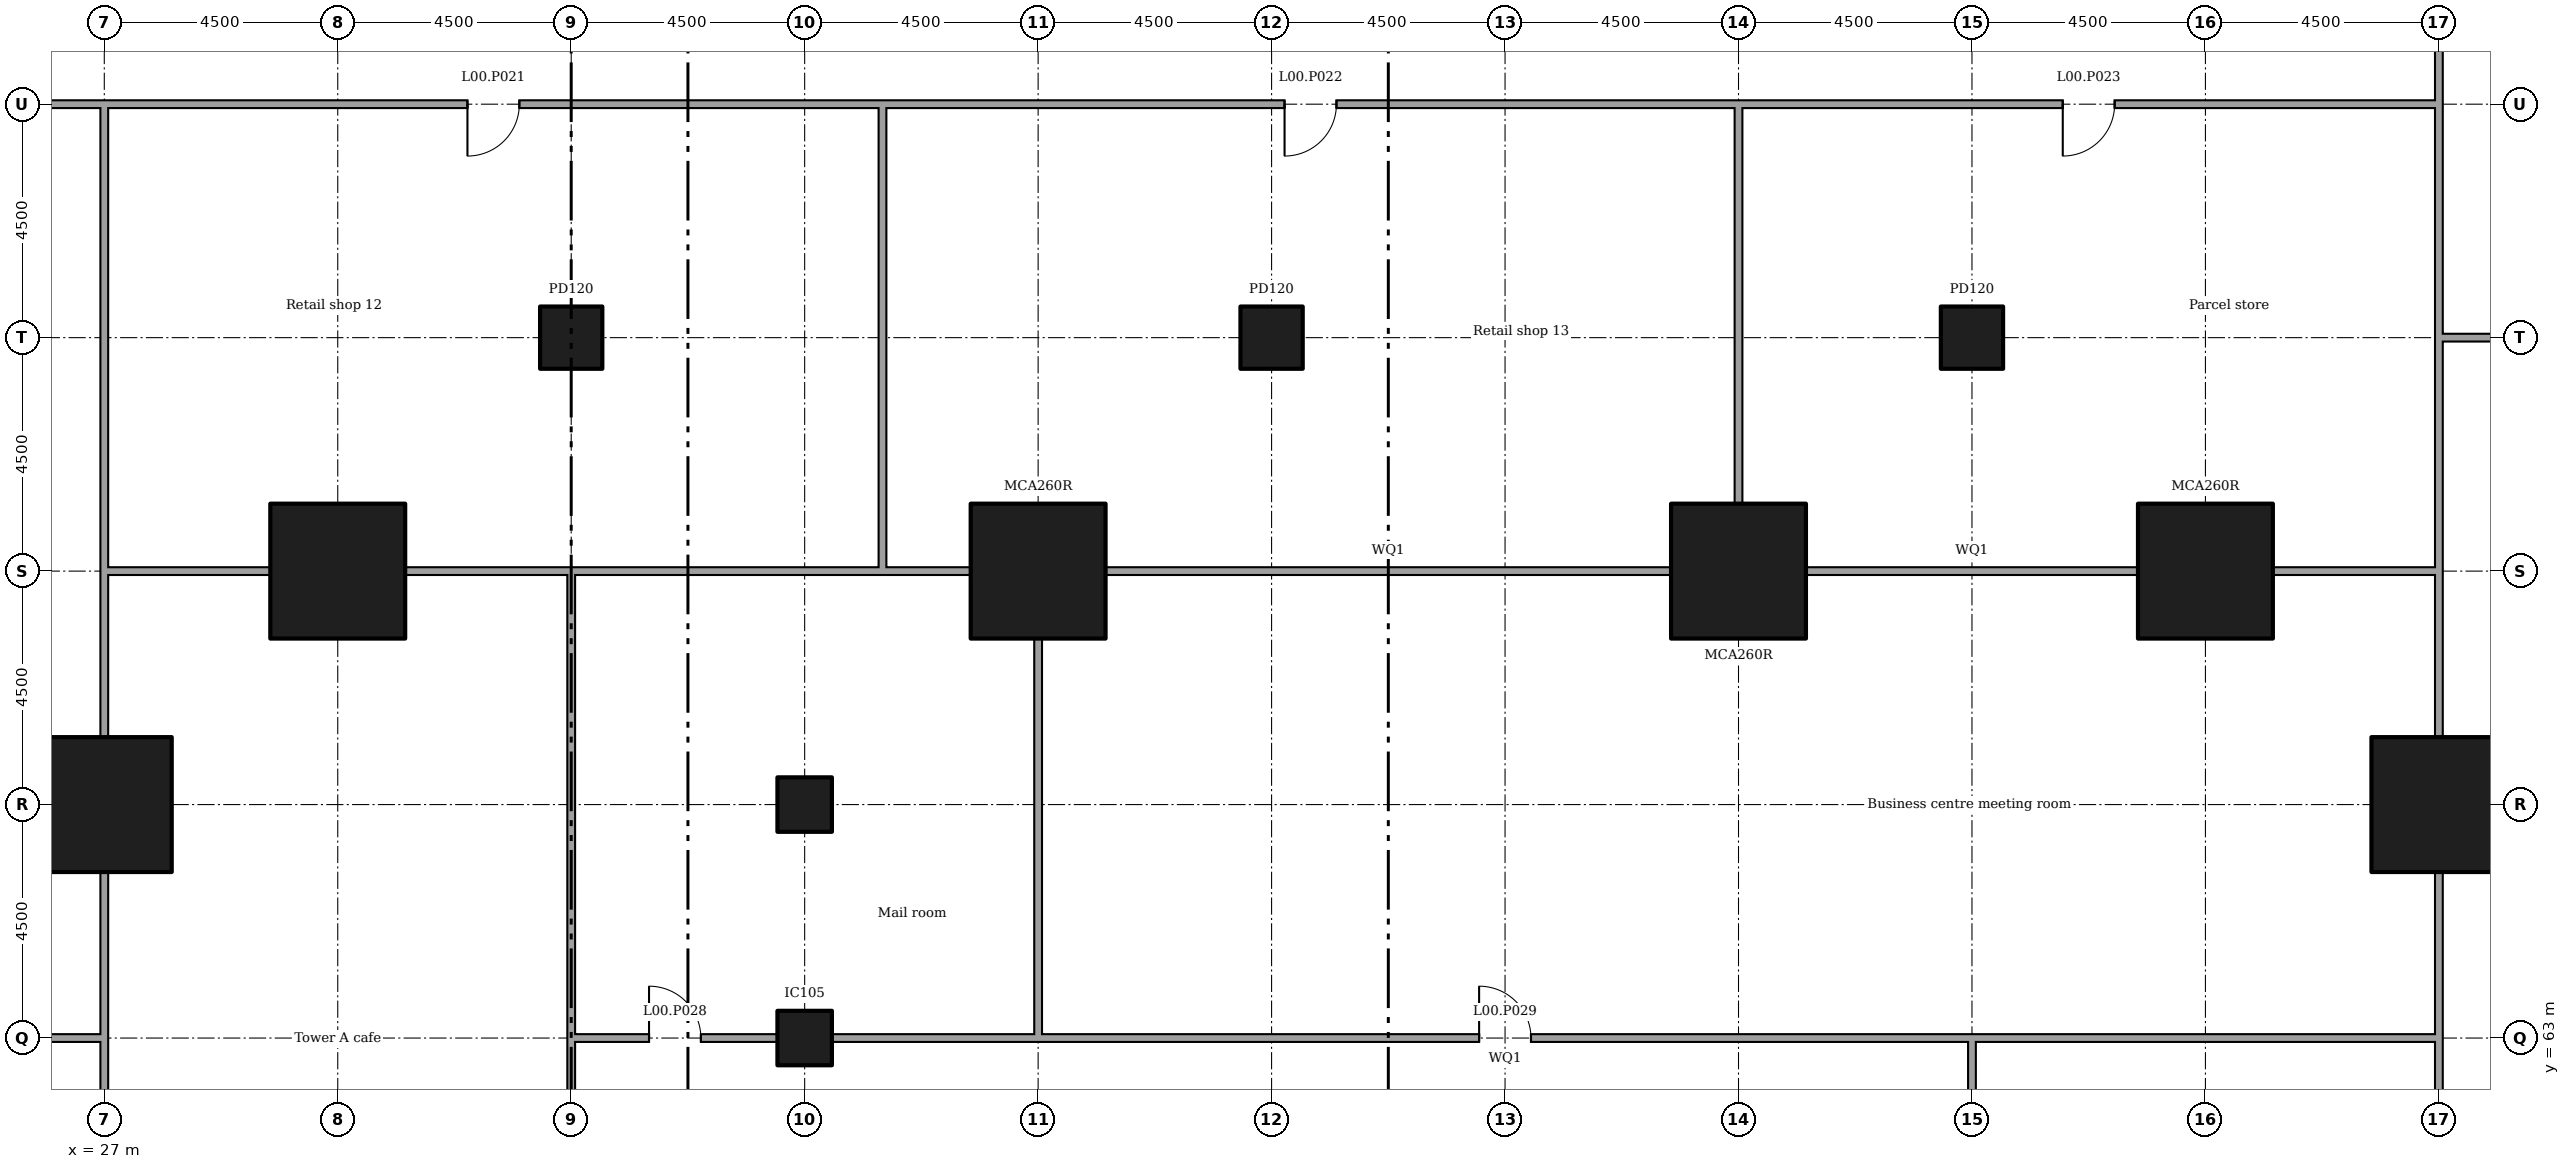
"""IFC4 building model, lengths in metres.
Left out: names, types, materials, properties, quantities, classifications, styles, units other than length and angle.
Written with IfcOpenShell. Run it as: python <this file> out.ifc"""

import sys

from ifc_helpers import new_model, si_unit, direction, frame, frame_2d, origin, origin_2d, place, context, subcontext, project, spatial, rectangle, extrude, element, fill, save


model = new_model("IFC4")
c1 = context("Model", 3, precision=1e-05, world=origin(), true_north=direction((0.0, 1.0)))
c2 = subcontext(c1, "Body", "Model", "MODEL_VIEW")
j1 = project(units=[si_unit("LENGTHUNIT", "METRE"), si_unit("PLANEANGLEUNIT", "RADIAN")], contexts=[c1])
p1 = place(None, origin())
s1 = spatial("IfcSite", under=j1, at=p1, CompositionType="ELEMENT")
p2 = place(p1, origin())
s2 = spatial("IfcBuilding", under=s1, at=p2, CompositionType="ELEMENT")
p3 = place(p2, origin())
s3 = spatial("IfcBuildingStorey", under=s2, at=p3, CompositionType="ELEMENT", Elevation=0.0)
for number, where in (
    (1, (27.0, 67.5, 0.0)),
    (2, (31.5, 72.0, 0.0)),
    (3, (45.0, 72.0, 0.0)),
    (4, (58.5, 72.0, 0.0)),
    (5, (67.5, 72.0, 0.0)),
    (6, (72.0, 67.5, 0.0)),
):
    element("IfcColumn", number, at=place(p3, frame(where)), inside=s3, PredefinedType="COLUMN", context=c2, shape_type="SweptSolid", body=[
        extrude(rectangle(XDim=2.6, YDim=2.6, at=origin_2d()), origin(), (0.0, 0.0, 1.0), 6.0),
    ])
for number, where in (
    (7, (40.5, 63.0, 0.0)),
    (8, (40.5, 67.5, 0.0)),
):
    element("IfcColumn", number, at=place(p3, frame(where)), inside=s3, PredefinedType="COLUMN", context=c2, shape_type="SweptSolid", body=[
        extrude(rectangle(XDim=1.05, YDim=1.05, at=origin_2d()), origin(), (0.0, 0.0, 1.0), 6.0),
    ])
for number, where in (
    (9, (36.0, 76.5, 0.0)),
    (10, (49.5, 76.5, 0.0)),
    (11, (63.0, 76.5, 0.0)),
):
    element("IfcColumn", number, at=place(p3, frame(where)), inside=s3, PredefinedType="COLUMN", context=c2, shape_type="SweptSolid", body=[
        extrude(rectangle(XDim=1.2, YDim=1.2, at=origin_2d()), origin(), (0.0, 0.0, 1.0), 6.0),
    ])
p4 = place(p3, frame((71.925, 76.5, 0.0)))
e12 = element("IfcWall", 12, at=p4, inside=s3, PredefinedType="PARTITIONING", context=c2, shape_type="SweptSolid", body=[
    extrude(rectangle(XDim=3.98, YDim=0.15, at=frame_2d((1.99, 0.0))), origin(), (0.0, 0.0, 1.0), 5.55),
])
p5 = place(p4, frame((1.125, 0.0, 0.0)))
e13 = element("IfcOpeningElement", 13, at=p5, cuts=e12, PredefinedType="OPENING", context=c2, shape_type="SweptSolid", body=[
    extrude(rectangle(XDim=1.8, YDim=2.1, at=frame_2d((0.9, 1.05))), frame((0.0, 0.085, 0.0), z_axis=(0.0, -1.0, 0.0), x_axis=(1.0, 0.0, 0.0)), (0.0, 0.0, 1.0), 0.17),
])
p6 = place(p3, frame((72.0, 71.925, 0.0), z_axis=(0.0, 0.0, 1.0), x_axis=(0.0, 1.0, 0.0)))
e14 = element("IfcWall", 14, at=p6, inside=s3, PredefinedType="PARTITIONING", context=c2, shape_type="SweptSolid", body=[
    extrude(rectangle(XDim=4.5, YDim=0.15, at=frame_2d((2.25, 0.0))), origin(), (0.0, 0.0, 1.0), 5.55),
])
p7 = place(p3, frame((72.0, 62.925, 0.0), z_axis=(0.0, 0.0, 1.0), x_axis=(0.0, 1.0, 0.0)))
e15 = element("IfcWall", 15, at=p7, inside=s3, PredefinedType="PARTITIONING", context=c2, shape_type="SweptSolid", body=[
    extrude(rectangle(XDim=3.28, YDim=0.15, at=frame_2d((1.64, 0.0))), origin(), (0.0, 0.0, 1.0), 5.55),
])
for number, where, z_axis, x_axis in (
    (16, (72.0, 68.795, 0.0), (0.0, 0.0, 1.0), (0.0, 1.0, 0.0)),
    (17, (72.0, 59.795, 0.0), (0.0, 0.0, 1.0), (0.0, 1.0, 0.0)),
):
    element("IfcWall", number, at=place(p3, frame(where, z_axis=z_axis, x_axis=x_axis)), inside=s3, PredefinedType="PARTITIONING", context=c2, shape_type="SweptSolid", body=[
        extrude(rectangle(XDim=3.205, YDim=0.15, at=frame_2d((1.603, 0.0))), origin(), (0.0, 0.0, 1.0), 5.55),
    ])
p8 = place(p3, frame((72.0, 80.925, 0.0), z_axis=(0.0, 0.0, 1.0), x_axis=(0.0, 1.0, 0.0)))
e18 = element("IfcWall", 18, at=p8, inside=s3, PredefinedType="PARTITIONING", context=c2, shape_type="SweptSolid", body=[
    extrude(rectangle(XDim=9.15, YDim=0.15, at=frame_2d((4.575, 0.0))), origin(), (0.0, 0.0, 1.0), 5.55),
])
p9 = place(p8, frame((3.675, 0.0, 0.0)))
e19 = element("IfcOpeningElement", 19, at=p9, cuts=e18, PredefinedType="OPENING", context=c2, shape_type="SweptSolid", body=[
    extrude(rectangle(XDim=1.8, YDim=2.1, at=frame_2d((0.9, 1.05))), frame((0.0, 0.085, 0.0), z_axis=(0.0, -1.0, 0.0), x_axis=(1.0, 0.0, 0.0)), (0.0, 0.0, 1.0), 0.17),
])
p10 = place(p3, frame((72.0, 76.5, 0.0), z_axis=(0.0, 0.0, 1.0), x_axis=(0.0, 1.0, 0.0)))
e20 = element("IfcWall", 20, at=p10, inside=s3, PredefinedType="PARTITIONING", context=c2, shape_type="SweptSolid", body=[
    extrude(rectangle(XDim=4.5, YDim=0.15, at=frame_2d((2.25, 0.0))), origin(), (0.0, 0.0, 1.0), 5.55),
])
p11 = place(p3, frame((18.075, 81.0, 0.0)))
e21 = element("IfcWall", 21, at=p11, inside=s3, PredefinedType="PARTITIONING", context=c2, shape_type="SweptSolid", body=[
    extrude(rectangle(XDim=9.0, YDim=0.15, at=frame_2d((4.5, 0.0))), origin(), (0.0, 0.0, 1.0), 5.55),
])
p12 = place(p3, frame((27.0, 81.0, 0.0)))
e22 = element("IfcWall", 22, at=p12, inside=s3, PredefinedType="PARTITIONING", context=c2, shape_type="SweptSolid", body=[
    extrude(rectangle(XDim=15.075, YDim=0.15, at=frame_2d((7.538, 0.0))), origin(), (0.0, 0.0, 1.0), 5.55),
])
p13 = place(p12, frame((7.0, 0.0, 0.0)))
e23 = element("IfcOpeningElement", 23, at=p13, cuts=e22, PredefinedType="OPENING", context=c2, shape_type="SweptSolid", body=[
    extrude(rectangle(XDim=1.0, YDim=2.1, at=frame_2d((0.5, 1.05))), frame((0.0, 0.085, 0.0), z_axis=(0.0, -1.0, 0.0), x_axis=(1.0, 0.0, 0.0)), (0.0, 0.0, 1.0), 0.17),
])
p14 = place(p3, frame((42.0, 81.0, 0.0)))
e24 = element("IfcWall", 24, at=p14, inside=s3, PredefinedType="PARTITIONING", context=c2, shape_type="SweptSolid", body=[
    extrude(rectangle(XDim=16.575, YDim=0.15, at=frame_2d((8.288, 0.0))), origin(), (0.0, 0.0, 1.0), 5.55),
])
p15 = place(p14, frame((7.75, 0.0, 0.0)))
e25 = element("IfcOpeningElement", 25, at=p15, cuts=e24, PredefinedType="OPENING", context=c2, shape_type="SweptSolid", body=[
    extrude(rectangle(XDim=1.0, YDim=2.1, at=frame_2d((0.5, 1.05))), frame((0.0, 0.085, 0.0), z_axis=(0.0, -1.0, 0.0), x_axis=(1.0, 0.0, 0.0)), (0.0, 0.0, 1.0), 0.17),
])
p16 = place(p3, frame((58.5, 81.0, 0.0)))
e26 = element("IfcWall", 26, at=p16, inside=s3, PredefinedType="PARTITIONING", context=c2, shape_type="SweptSolid", body=[
    extrude(rectangle(XDim=13.425, YDim=0.15, at=frame_2d((6.712, 0.0))), origin(), (0.0, 0.0, 1.0), 5.55),
])
p17 = place(p16, frame((6.25, 0.0, 0.0)))
e27 = element("IfcOpeningElement", 27, at=p17, cuts=e26, PredefinedType="OPENING", context=c2, shape_type="SweptSolid", body=[
    extrude(rectangle(XDim=1.0, YDim=2.1, at=frame_2d((0.5, 1.05))), frame((0.0, 0.085, 0.0), z_axis=(0.0, -1.0, 0.0), x_axis=(1.0, 0.0, 0.0)), (0.0, 0.0, 1.0), 0.17),
])
p18 = place(p3, frame((23.095, 63.0, 0.0)))
e28 = element("IfcWall", 28, at=p18, inside=s3, PredefinedType="PARTITIONING", context=c2, shape_type="SweptSolid", body=[
    extrude(rectangle(XDim=3.98, YDim=0.15, at=frame_2d((1.99, 0.0))), origin(), (0.0, 0.0, 1.0), 5.55),
])
p19 = place(p3, frame((27.0, 59.795, 0.0), z_axis=(0.0, 0.0, 1.0), x_axis=(0.0, 1.0, 0.0)))
e29 = element("IfcWall", 29, at=p19, inside=s3, PredefinedType="PARTITIONING", context=c2, shape_type="SweptSolid", body=[
    extrude(rectangle(XDim=3.13, YDim=0.15, at=frame_2d((1.565, 0.0))), origin(), (0.0, 0.0, 1.0), 5.55),
])
p20 = place(p3, frame((27.0, 71.925, 0.0), z_axis=(0.0, 0.0, 1.0), x_axis=(0.0, 1.0, 0.0)))
e30 = element("IfcWall", 30, at=p20, inside=s3, PredefinedType="PARTITIONING", context=c2, shape_type="SweptSolid", body=[
    extrude(rectangle(XDim=9.0, YDim=0.15, at=frame_2d((4.5, 0.0))), origin(), (0.0, 0.0, 1.0), 5.55),
])
for number, where, z_axis, x_axis in (
    (31, (27.0, 63.0, 0.0), (0.0, 0.0, 1.0), (0.0, 1.0, 0.0)),
    (32, (27.0, 68.795, 0.0), (0.0, 0.0, 1.0), (0.0, 1.0, 0.0)),
):
    element("IfcWall", number, at=place(p3, frame(where, z_axis=z_axis, x_axis=x_axis)), inside=s3, PredefinedType="PARTITIONING", context=c2, shape_type="SweptSolid", body=[
        extrude(rectangle(XDim=3.205, YDim=0.15, at=frame_2d((1.603, 0.0))), origin(), (0.0, 0.0, 1.0), 5.55),
    ])
p21 = place(p3, frame((42.0, 71.925, 0.0), z_axis=(0.0, 0.0, 1.0), x_axis=(0.0, 1.0, 0.0)))
e33 = element("IfcWall", 33, at=p21, inside=s3, PredefinedType="PARTITIONING", context=c2, shape_type="SweptSolid", body=[
    extrude(rectangle(XDim=9.0, YDim=0.15, at=frame_2d((4.5, 0.0))), origin(), (0.0, 0.0, 1.0), 5.55),
])
p22 = place(p3, frame((27.075, 72.0, 0.0)))
e34 = element("IfcWall", 34, at=p22, inside=s3, PredefinedType="PARTITIONING", context=c2, shape_type="SweptSolid", body=[
    extrude(rectangle(XDim=3.13, YDim=0.15, at=frame_2d((1.565, 0.0))), origin(), (0.0, 0.0, 1.0), 5.55),
])
p23 = place(p3, frame((32.795, 72.0, 0.0)))
e35 = element("IfcWall", 35, at=p23, inside=s3, PredefinedType="PARTITIONING", context=c2, shape_type="SweptSolid", body=[
    extrude(rectangle(XDim=3.28, YDim=0.15, at=frame_2d((1.64, 0.0))), origin(), (0.0, 0.0, 1.0), 5.55),
])
p24 = place(p3, frame((36.0, 72.0, 0.0)))
e36 = element("IfcWall", 36, at=p24, inside=s3, PredefinedType="PARTITIONING", context=c2, shape_type="SweptSolid", body=[
    extrude(rectangle(XDim=6.0, YDim=0.15, at=frame_2d((3.0, 0.0))), origin(), (0.0, 0.0, 1.0), 5.55),
])
p25 = place(p3, frame((58.5, 73.295, 0.0), z_axis=(0.0, 0.0, 1.0), x_axis=(0.0, 1.0, 0.0)))
e37 = element("IfcWall", 37, at=p25, inside=s3, PredefinedType="PARTITIONING", context=c2, shape_type="SweptSolid", body=[
    extrude(rectangle(XDim=7.63, YDim=0.15, at=frame_2d((3.815, 0.0))), origin(), (0.0, 0.0, 1.0), 5.55),
])
p26 = place(p3, frame((42.075, 72.0, 0.0)))
e38 = element("IfcWall", 38, at=p26, inside=s3, PredefinedType="PARTITIONING", context=c2, shape_type="SweptSolid", body=[
    extrude(rectangle(XDim=1.63, YDim=0.15, at=frame_2d((0.815, 0.0))), origin(), (0.0, 0.0, 1.0), 5.55),
])
p27 = place(p3, frame((46.295, 72.0, 0.0)))
e39 = element("IfcWall", 39, at=p27, inside=s3, PredefinedType="PARTITIONING", context=c2, shape_type="SweptSolid", body=[
    extrude(rectangle(XDim=10.91, YDim=0.15, at=frame_2d((5.455, 0.0))), origin(), (0.0, 0.0, 1.0), 5.55),
])
p28 = place(p3, frame((59.795, 72.0, 0.0)))
e40 = element("IfcWall", 40, at=p28, inside=s3, PredefinedType="PARTITIONING", context=c2, shape_type="SweptSolid", body=[
    extrude(rectangle(XDim=6.41, YDim=0.15, at=frame_2d((3.205, 0.0))), origin(), (0.0, 0.0, 1.0), 5.55),
])
p29 = place(p3, frame((68.795, 72.0, 0.0)))
e41 = element("IfcWall", 41, at=p29, inside=s3, PredefinedType="PARTITIONING", context=c2, shape_type="SweptSolid", body=[
    extrude(rectangle(XDim=3.13, YDim=0.15, at=frame_2d((1.565, 0.0))), origin(), (0.0, 0.0, 1.0), 5.55),
])
p30 = place(p3, frame((36.0, 62.925, 0.0), z_axis=(0.0, 0.0, 1.0), x_axis=(0.0, 1.0, 0.0)))
e42 = element("IfcWall", 42, at=p30, inside=s3, PredefinedType="PARTITIONING", context=c2, shape_type="SweptSolid", body=[
    extrude(rectangle(XDim=9.0, YDim=0.15, at=frame_2d((4.5, 0.0))), origin(), (0.0, 0.0, 1.0), 5.55),
])
p31 = place(p3, frame((36.0, 45.0, 0.0), z_axis=(0.0, 0.0, 1.0), x_axis=(0.0, 1.0, 0.0)))
e43 = element("IfcWall", 43, at=p31, inside=s3, PredefinedType="PARTITIONING", context=c2, shape_type="SweptSolid", body=[
    extrude(rectangle(XDim=18.0, YDim=0.15, at=frame_2d((9.0, 0.0))), origin(), (0.0, 0.0, 1.0), 5.55),
])
p32 = place(p31, frame((8.5, 0.0, 0.0)))
e44 = element("IfcOpeningElement", 44, at=p32, cuts=e43, PredefinedType="OPENING", context=c2, shape_type="SweptSolid", body=[
    extrude(rectangle(XDim=1.0, YDim=2.1, at=frame_2d((0.5, 1.05))), frame((0.0, 0.085, 0.0), z_axis=(0.0, -1.0, 0.0), x_axis=(1.0, 0.0, 0.0)), (0.0, 0.0, 1.0), 0.17),
])
p33 = place(p3, frame((45.0, 62.925, 0.0), z_axis=(0.0, 0.0, 1.0), x_axis=(0.0, 1.0, 0.0)))
e45 = element("IfcWall", 45, at=p33, inside=s3, PredefinedType="PARTITIONING", context=c2, shape_type="SweptSolid", body=[
    extrude(rectangle(XDim=7.78, YDim=0.15, at=frame_2d((3.89, 0.0))), origin(), (0.0, 0.0, 1.0), 5.55),
])
p34 = place(p3, frame((36.075, 63.0, 0.0)))
e46 = element("IfcWall", 46, at=p34, inside=s3, PredefinedType="PARTITIONING", context=c2, shape_type="SweptSolid", body=[
    extrude(rectangle(XDim=3.905, YDim=0.15, at=frame_2d((1.953, 0.0))), origin(), (0.0, 0.0, 1.0), 5.55),
])
p35 = place(p34, frame((1.425, 0.0, 0.0)))
e47 = element("IfcOpeningElement", 47, at=p35, cuts=e46, PredefinedType="OPENING", context=c2, shape_type="SweptSolid", body=[
    extrude(rectangle(XDim=1.0, YDim=2.1, at=frame_2d((0.5, 1.05))), frame((0.0, 0.085, 0.0), z_axis=(0.0, -1.0, 0.0), x_axis=(1.0, 0.0, 0.0)), (0.0, 0.0, 1.0), 0.17),
])
p36 = place(p3, frame((41.02, 63.0, 0.0)))
e48 = element("IfcWall", 48, at=p36, inside=s3, PredefinedType="PARTITIONING", context=c2, shape_type="SweptSolid", body=[
    extrude(rectangle(XDim=3.905, YDim=0.15, at=frame_2d((1.953, 0.0))), origin(), (0.0, 0.0, 1.0), 5.55),
])
p37 = place(p3, frame((62.925, 63.0, 0.0)))
e49 = element("IfcWall", 49, at=p37, inside=s3, PredefinedType="PARTITIONING", context=c2, shape_type="SweptSolid", body=[
    extrude(rectangle(XDim=9.0, YDim=0.15, at=frame_2d((4.5, 0.0))), origin(), (0.0, 0.0, 1.0), 5.55),
])
p38 = place(p3, frame((45.0, 63.0, 0.0)))
e50 = element("IfcWall", 50, at=p38, inside=s3, PredefinedType="PARTITIONING", context=c2, shape_type="SweptSolid", body=[
    extrude(rectangle(XDim=18.0, YDim=0.15, at=frame_2d((9.0, 0.0))), origin(), (0.0, 0.0, 1.0), 5.55),
])
p39 = place(p38, frame((8.5, 0.0, 0.0)))
e51 = element("IfcOpeningElement", 51, at=p39, cuts=e50, PredefinedType="OPENING", context=c2, shape_type="SweptSolid", body=[
    extrude(rectangle(XDim=1.0, YDim=2.1, at=frame_2d((0.5, 1.05))), frame((0.0, 0.085, 0.0), z_axis=(0.0, -1.0, 0.0), x_axis=(1.0, 0.0, 0.0)), (0.0, 0.0, 1.0), 0.17),
])
p40 = place(p3, frame((63.0, 59.02, 0.0), z_axis=(0.0, 0.0, 1.0), x_axis=(0.0, 1.0, 0.0)))
e52 = element("IfcWall", 52, at=p40, inside=s3, PredefinedType="PARTITIONING", context=c2, shape_type="SweptSolid", body=[
    extrude(rectangle(XDim=3.905, YDim=0.15, at=frame_2d((1.953, 0.0))), origin(), (0.0, 0.0, 1.0), 5.55),
])
p41 = place(p40, frame((1.1, 0.0, 0.0)))
e53 = element("IfcOpeningElement", 53, at=p41, cuts=e52, PredefinedType="OPENING", context=c2, shape_type="SweptSolid", body=[
    extrude(rectangle(XDim=1.8, YDim=2.1, at=frame_2d((0.9, 1.05))), frame((0.0, 0.085, 0.0), z_axis=(0.0, -1.0, 0.0), x_axis=(1.0, 0.0, 0.0)), (0.0, 0.0, 1.0), 0.17),
])
p42 = place(p13, frame((1.0, 0.0, 0.0), x_axis=(-1.0, 0.0, 0.0)))
e54 = element("IfcDoor", 54, at=p42, inside=s3, OperationType="SINGLE_SWING_LEFT", PredefinedType="DOOR", context=c2, shape_type="SweptSolid", body=[
    extrude(rectangle(XDim=1.0, YDim=2.1, at=frame_2d((0.5, 1.05))), frame((0.0, 0.025, 0.0), z_axis=(0.0, -1.0, 0.0), x_axis=(1.0, 0.0, 0.0)), (0.0, 0.0, 1.0), 0.05),
])
fill(e23, e54)
p43 = place(p15, frame((1.0, 0.0, 0.0), x_axis=(-1.0, 0.0, 0.0)))
e55 = element("IfcDoor", 55, at=p43, inside=s3, OperationType="SINGLE_SWING_LEFT", PredefinedType="DOOR", context=c2, shape_type="SweptSolid", body=[
    extrude(rectangle(XDim=1.0, YDim=2.1, at=frame_2d((0.5, 1.05))), frame((0.0, 0.025, 0.0), z_axis=(0.0, -1.0, 0.0), x_axis=(1.0, 0.0, 0.0)), (0.0, 0.0, 1.0), 0.05),
])
fill(e25, e55)
p44 = place(p17, frame((1.0, 0.0, 0.0), x_axis=(-1.0, 0.0, 0.0)))
e56 = element("IfcDoor", 56, at=p44, inside=s3, OperationType="SINGLE_SWING_LEFT", PredefinedType="DOOR", context=c2, shape_type="SweptSolid", body=[
    extrude(rectangle(XDim=1.0, YDim=2.1, at=frame_2d((0.5, 1.05))), frame((0.0, 0.025, 0.0), z_axis=(0.0, -1.0, 0.0), x_axis=(1.0, 0.0, 0.0)), (0.0, 0.0, 1.0), 0.05),
])
fill(e27, e56)
p45 = place(p35, origin())
e57 = element("IfcDoor", 57, at=p45, inside=s3, OperationType="SINGLE_SWING_RIGHT", PredefinedType="DOOR", context=c2, shape_type="SweptSolid", body=[
    extrude(rectangle(XDim=1.0, YDim=2.1, at=frame_2d((0.5, 1.05))), frame((0.0, 0.025, 0.0), z_axis=(0.0, -1.0, 0.0), x_axis=(1.0, 0.0, 0.0)), (0.0, 0.0, 1.0), 0.05),
])
fill(e47, e57)
p46 = place(p39, origin())
e58 = element("IfcDoor", 58, at=p46, inside=s3, OperationType="SINGLE_SWING_RIGHT", PredefinedType="DOOR", context=c2, shape_type="SweptSolid", body=[
    extrude(rectangle(XDim=1.0, YDim=2.1, at=frame_2d((0.5, 1.05))), frame((0.0, 0.025, 0.0), z_axis=(0.0, -1.0, 0.0), x_axis=(1.0, 0.0, 0.0)), (0.0, 0.0, 1.0), 0.05),
])
fill(e51, e58)
save(model, sys.argv[1])
